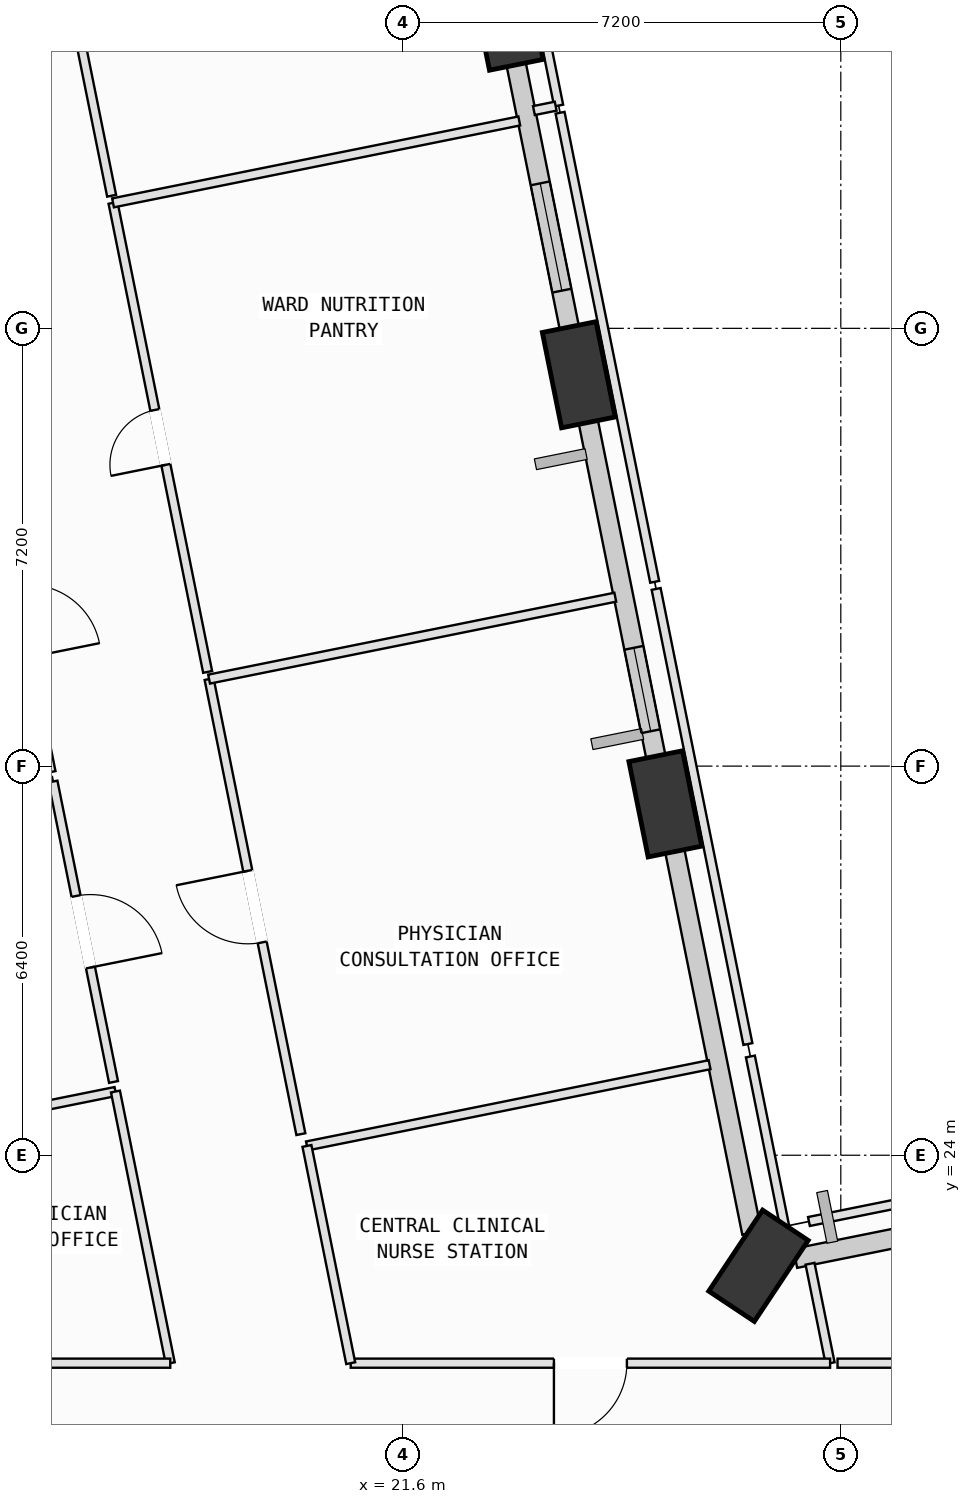
"""IFC4 building model, lengths in metres.
Left out: names, types, materials, properties, quantities, classifications, styles, units other than length and angle.
Written with IfcOpenShell. Run it as: python <this file> out.ifc"""

import sys

from ifc_helpers import new_model, si_unit, direction, frame, frame_2d, origin, origin_2d, place, context, subcontext, project, spatial, rectangle, extrude, element, fill, save


model = new_model("IFC4")
c1 = context("Model", 3, precision=1e-05, world=origin(), true_north=direction((0.0, 1.0)))
c2 = subcontext(c1, "Body", "Model", "MODEL_VIEW")
j1 = project(units=[si_unit("LENGTHUNIT", "METRE"), si_unit("PLANEANGLEUNIT", "RADIAN")], contexts=[c1])
p1 = place(None, origin())
s1 = spatial("IfcSite", under=j1, at=p1, CompositionType="ELEMENT")
p2 = place(p1, origin())
s2 = spatial("IfcBuilding", under=s1, at=p2, CompositionType="ELEMENT")
p3 = place(p2, frame((0.0, 0.0, 71.0)))
s3 = spatial("IfcBuildingStorey", under=s2, at=p3, CompositionType="ELEMENT", Elevation=71.0)
p4 = place(p3, frame((27.446, 22.182, 0.002), z_axis=(0.011052567647, -0.025402586416, 0.999616201025), x_axis=(0.175259325903, 0.98425187011, 0.023074333536)))
e1 = element("IfcColumn", 1, at=p4, inside=s3, PredefinedType="COLUMN", context=c2, shape_type="SweptSolid", body=[
    extrude(rectangle(XDim=1.6, YDim=0.9, at=origin_2d()), origin(), (0.0, 0.0, 1.0), 3.998),
])
p5 = place(p3, frame((25.914, 29.779, 0.002), z_axis=(-0.020327474655, -0.031986776934, 0.999281561861), x_axis=(0.358573515235, 0.932761915161, 0.037151632506)))
e2 = element("IfcColumn", 2, at=p5, inside=s3, PredefinedType="COLUMN", context=c2, shape_type="SweptSolid", body=[
    extrude(rectangle(XDim=1.6, YDim=0.9, at=origin_2d()), origin(), (0.0, 0.0, 1.0), 4.0),
])
p6 = place(p3, frame((24.491, 36.837, 0.002), z_axis=(-0.04944522251, -0.038105134487, 0.998049682479), x_axis=(0.654284243965, 0.753768890214, 0.061193040821)))
e3 = element("IfcColumn", 3, at=p6, inside=s3, PredefinedType="COLUMN", context=c2, shape_type="SweptSolid", body=[
    extrude(rectangle(XDim=1.6, YDim=0.9, at=origin_2d()), origin(), (0.0, 0.0, 1.0), 4.004),
])
p7 = place(p3, frame((23.305, 42.719, 0.002), z_axis=(-0.07364612951, -0.043092115449, 0.996353008323), x_axis=(0.743170140005, 0.663853828041, 0.083643517389)))
e4 = element("IfcColumn", 4, at=p7, inside=s3, PredefinedType="COLUMN", context=c2, shape_type="SweptSolid", body=[
    extrude(rectangle(XDim=1.6, YDim=0.9, at=origin_2d()), origin(), (0.0, 0.0, 1.0), 4.011),
])
p8 = place(p3, frame((28.051, 22.304, 0.0), z_axis=(0.0, 0.0, 1.0), x_axis=(0.980271717469, 0.197654648138, 0.0)))
e5 = element("IfcWall", 5, at=p8, inside=s3, PredefinedType="SOLIDWALL", context=c2, shape_type="SweptSolid", body=[
    extrude(rectangle(XDim=5.736, YDim=0.32, at=frame_2d((2.868, 0.0))), origin(), (0.0, 0.0, 1.0), 3.165),
])
p9 = place(p8, frame((2.344, 0.0, 0.75)))
e6 = element("IfcOpeningElement", 6, at=p9, cuts=e5, PredefinedType="OPENING", context=c2, shape_type="SweptSolid", body=[
    extrude(rectangle(XDim=1.6, YDim=1.95, at=frame_2d((0.8, 0.975))), frame((0.0, 0.17, 0.0), z_axis=(0.0, -1.0, 0.0), x_axis=(1.0, 0.0, 0.0)), (0.0, 0.0, 1.0), 0.34),
])
p10 = place(p3, frame((27.337, 22.725, 0.0), z_axis=(0.0, 0.0, 1.0), x_axis=(-0.1976674394, 0.980269138248, 0.0)))
e7 = element("IfcWall", 7, at=p10, inside=s3, PredefinedType="SOLIDWALL", context=c2, shape_type="SweptSolid", body=[
    extrude(rectangle(XDim=6.536, YDim=0.32, at=frame_2d((3.268, 0.0))), origin(), (0.0, 0.0, 1.0), 2.865),
])
p11 = place(p3, frame((25.805, 30.319, 0.0), z_axis=(0.0, 0.0, 1.0), x_axis=(-0.197666151395, 0.980269397968, 0.0)))
e8 = element("IfcWall", 8, at=p11, inside=s3, PredefinedType="SOLIDWALL", context=c2, shape_type="SweptSolid", body=[
    extrude(rectangle(XDim=5.997, YDim=0.32, at=frame_2d((2.998, 0.0))), origin(), (0.0, 0.0, 1.0), 3.165),
])
p12 = place(p11, frame((0.667, 0.0, 0.75)))
e9 = element("IfcOpeningElement", 9, at=p12, cuts=e8, PredefinedType="OPENING", context=c2, shape_type="SweptSolid", body=[
    extrude(rectangle(XDim=1.4, YDim=1.85, at=frame_2d((0.7, 0.925))), frame((0.0, 0.17, 0.0), z_axis=(0.0, -1.0, 0.0), x_axis=(1.0, 0.0, 0.0)), (0.0, 0.0, 1.0), 0.34),
])
p13 = place(p3, frame((24.384, 37.368, 0.0), z_axis=(0.0, 0.0, 1.0), x_axis=(-0.197636570542, 0.980275362327, 0.0)))
e10 = element("IfcWall", 10, at=p13, inside=s3, PredefinedType="SOLIDWALL", context=c2, shape_type="SweptSolid", body=[
    extrude(rectangle(XDim=4.816, YDim=0.32, at=frame_2d((2.408, 0.0))), origin(), (0.0, 0.0, 1.0), 3.165),
])
p14 = place(p13, frame((0.869, 0.0, 0.75)))
e11 = element("IfcOpeningElement", 11, at=p14, cuts=e10, PredefinedType="OPENING", context=c2, shape_type="SweptSolid", body=[
    extrude(rectangle(XDim=1.8, YDim=2.05, at=frame_2d((0.9, 1.025))), frame((0.0, 0.17, 0.0), z_axis=(0.0, -1.0, 0.0), x_axis=(1.0, 0.0, 0.0)), (0.0, 0.0, 1.0), 0.34),
])
p15 = place(p3, frame((6.122, 22.881, 0.0), z_axis=(0.0, 0.0, 1.0), x_axis=(0.980278085225, 0.197623064515, 0.0)))
e12 = element("IfcWall", 12, at=p15, inside=s3, PredefinedType="PARTITIONING", context=c2, shape_type="SweptSolid", body=[
    extrude(rectangle(XDim=10.965, YDim=0.15, at=frame_2d((5.483, 0.0))), origin(), (0.0, 0.0, 1.0), 3.78),
])
p16 = place(p3, frame((16.871, 25.048, 0.0), z_axis=(0.0, 0.0, 1.0), x_axis=(0.197650705998, -0.980272512324, 0.0)))
e13 = element("IfcWall", 13, at=p16, inside=s3, PredefinedType="PARTITIONING", context=c2, shape_type="SweptSolid", body=[
    extrude(rectangle(XDim=4.558, YDim=0.15, at=frame_2d((2.279, 0.0))), origin(), (0.0, 0.0, 1.0), 3.78),
])
p17 = place(p3, frame((17.772, 20.58, 0.0), z_axis=(0.0, 0.0, 1.0), x_axis=(-1.0, 0.0, 0.0)))
e14 = element("IfcWall", 14, at=p17, inside=s3, PredefinedType="PARTITIONING", context=c2, shape_type="SweptSolid", body=[
    extrude(rectangle(XDim=8.425, YDim=0.15, at=frame_2d((4.212, 0.0))), origin(), (0.0, 0.0, 1.0), 3.78),
])
p18 = place(p17, frame((3.613, 0.0, 0.0)))
e15 = element("IfcOpeningElement", 15, at=p18, cuts=e14, PredefinedType="OPENING", context=c2, shape_type="SweptSolid", body=[
    extrude(rectangle(XDim=1.2, YDim=2.15, at=frame_2d((0.6, 1.075))), frame((0.0, 0.085, 0.0), z_axis=(0.0, -1.0, 0.0), x_axis=(1.0, 0.0, 0.0)), (0.0, 0.0, 1.0), 0.17),
])
p19 = place(p3, frame((4.737, 27.906, 0.0), z_axis=(0.0, 0.0, 1.0), x_axis=(0.980260288007, 0.197711324301, 0.0)))
e16 = element("IfcWall", 16, at=p19, inside=s3, PredefinedType="PARTITIONING", context=c2, shape_type="SweptSolid", body=[
    extrude(rectangle(XDim=11.33, YDim=0.15, at=frame_2d((5.665, 0.0))), origin(), (0.0, 0.0, 1.0), 3.78),
])
p20 = place(p3, frame((15.843, 30.146, 0.0), z_axis=(0.0, 0.0, 1.0), x_axis=(0.197624916703, -0.980277711824, 0.0)))
e17 = element("IfcWall", 17, at=p20, inside=s3, PredefinedType="PARTITIONING", context=c2, shape_type="SweptSolid", body=[
    extrude(rectangle(XDim=5.04, YDim=0.15, at=frame_2d((2.52, 0.0))), origin(), (0.0, 0.0, 1.0), 3.78),
])
p21 = place(p20, frame((1.92, 0.0, 0.0)))
e18 = element("IfcOpeningElement", 18, at=p21, cuts=e17, PredefinedType="OPENING", context=c2, shape_type="SweptSolid", body=[
    extrude(rectangle(XDim=1.2, YDim=2.15, at=frame_2d((0.6, 1.075))), frame((0.0, 0.085, 0.0), z_axis=(0.0, -1.0, 0.0), x_axis=(1.0, 0.0, 0.0)), (0.0, 0.0, 1.0), 0.17),
])
p22 = place(p3, frame((14.815, 35.243, 0.0), z_axis=(0.0, 0.0, 1.0), x_axis=(0.197662458337, -0.980270142646, 0.0)))
e19 = element("IfcWall", 19, at=p22, inside=s3, PredefinedType="PARTITIONING", context=c2, shape_type="SweptSolid", body=[
    extrude(rectangle(XDim=5.039, YDim=0.15, at=frame_2d((2.52, 0.0))), origin(), (0.0, 0.0, 1.0), 3.78),
])
p23 = place(p22, frame((1.92, 0.0, 0.0)))
e20 = element("IfcOpeningElement", 20, at=p23, cuts=e19, PredefinedType="OPENING", context=c2, shape_type="SweptSolid", body=[
    extrude(rectangle(XDim=1.2, YDim=2.15, at=frame_2d((0.6, 1.075))), frame((0.0, 0.085, 0.0), z_axis=(0.0, -1.0, 0.0), x_axis=(1.0, 0.0, 0.0)), (0.0, 0.0, 1.0), 0.17),
])
p24 = place(p3, frame((20.02, 24.153, 0.0), z_axis=(0.0, 0.0, 1.0), x_axis=(0.980251267329, 0.197756043903, 0.0)))
e21 = element("IfcWall", 21, at=p24, inside=s3, PredefinedType="PARTITIONING", context=c2, shape_type="SweptSolid", body=[
    extrude(rectangle(XDim=6.755, YDim=0.15, at=frame_2d((3.378, 0.0))), origin(), (0.0, 0.0, 1.0), 3.78),
])
p25 = place(p3, frame((27.313, 25.624, 0.0), z_axis=(0.0, 0.0, 1.0), x_axis=(0.19753261981, -0.980296314443, 0.0)))
e22 = element("IfcWall", 22, at=p25, inside=s3, PredefinedType="PARTITIONING", context=c2, shape_type="SweptSolid", body=[
    extrude(rectangle(XDim=2.85, YDim=0.15, at=frame_2d((1.425, 0.0))), origin(), (0.0, 0.0, 1.0), 3.78),
])
p26 = place(p3, frame((28.294, 22.215, 0.0), z_axis=(0.0, 0.0, 1.0), x_axis=(0.197889115296, -0.980224412085, 0.0)))
e23 = element("IfcWall", 23, at=p26, inside=s3, PredefinedType="PARTITIONING", context=c2, shape_type="SweptSolid", body=[
    extrude(rectangle(XDim=1.668, YDim=0.15, at=frame_2d((0.834, 0.0))), origin(), (0.0, 0.0, 1.0), 3.78),
])
p27 = place(p3, frame((28.624, 20.58, 0.0), z_axis=(0.0, 0.0, 1.0), x_axis=(-1.0, 0.0, 0.0)))
e24 = element("IfcWall", 24, at=p27, inside=s3, PredefinedType="PARTITIONING", context=c2, shape_type="SweptSolid", body=[
    extrude(rectangle(XDim=7.884, YDim=0.15, at=frame_2d((3.942, 0.0))), origin(), (0.0, 0.0, 1.0), 3.78),
])
p28 = place(p27, frame((3.342, 0.0, 0.0)))
e25 = element("IfcOpeningElement", 25, at=p28, cuts=e24, PredefinedType="OPENING", context=c2, shape_type="SweptSolid", body=[
    extrude(rectangle(XDim=1.2, YDim=2.15, at=frame_2d((0.6, 1.075))), frame((0.0, 0.085, 0.0), z_axis=(0.0, -1.0, 0.0), x_axis=(1.0, 0.0, 0.0)), (0.0, 0.0, 1.0), 0.17),
])
p29 = place(p3, frame((20.74, 20.58, 0.0), z_axis=(0.0, 0.0, 1.0), x_axis=(-0.197532878548, 0.980296262307, 0.0)))
e26 = element("IfcWall", 26, at=p29, inside=s3, PredefinedType="PARTITIONING", context=c2, shape_type="SweptSolid", body=[
    extrude(rectangle(XDim=3.645, YDim=0.15, at=frame_2d((1.822, 0.0))), origin(), (0.0, 0.0, 1.0), 3.78),
])
p30 = place(p3, frame((28.276, 22.91, 0.0), z_axis=(0.0, 0.0, 1.0), x_axis=(0.980264273595, 0.197691562574, 0.0)))
e27 = element("IfcWall", 27, at=p30, inside=s3, PredefinedType="PARTITIONING", context=c2, shape_type="SweptSolid", body=[
    extrude(rectangle(XDim=8.164, YDim=0.15, at=frame_2d((4.082, 0.0))), origin(), (0.0, 0.0, 1.0), 3.78),
])
p31 = place(p3, frame((33.616, 20.58, 0.0), z_axis=(0.0, 0.0, 1.0), x_axis=(-1.0, 0.0, 0.0)))
e28 = element("IfcWall", 28, at=p31, inside=s3, PredefinedType="PARTITIONING", context=c2, shape_type="SweptSolid", body=[
    extrude(rectangle(XDim=4.87, YDim=0.15, at=frame_2d((2.435, 0.0))), origin(), (0.0, 0.0, 1.0), 3.78),
])
p32 = place(p31, frame((1.835, 0.0, 0.0)))
e29 = element("IfcOpeningElement", 29, at=p32, cuts=e28, PredefinedType="OPENING", context=c2, shape_type="SweptSolid", body=[
    extrude(rectangle(XDim=1.2, YDim=2.15, at=frame_2d((0.6, 1.075))), frame((0.0, 0.085, 0.0), z_axis=(0.0, -1.0, 0.0), x_axis=(1.0, 0.0, 0.0)), (0.0, 0.0, 1.0), 0.17),
])
p33 = place(p3, frame((19.92, 24.347, 0.0), z_axis=(0.0, 0.0, 1.0), x_axis=(-0.197653276626, 0.980271994009, 0.0)))
e30 = element("IfcWall", 30, at=p33, inside=s3, PredefinedType="PARTITIONING", context=c2, shape_type="SweptSolid", body=[
    extrude(rectangle(XDim=7.635, YDim=0.15, at=frame_2d((3.817, 0.0))), origin(), (0.0, 0.0, 1.0), 3.78),
])
p34 = place(p33, frame((3.217, 0.0, 0.0)))
e31 = element("IfcOpeningElement", 31, at=p34, cuts=e30, PredefinedType="OPENING", context=c2, shape_type="SweptSolid", body=[
    extrude(rectangle(XDim=1.2, YDim=2.15, at=frame_2d((0.6, 1.075))), frame((0.0, 0.085, 0.0), z_axis=(0.0, -1.0, 0.0), x_axis=(1.0, 0.0, 0.0)), (0.0, 0.0, 1.0), 0.17),
])
p35 = place(p3, frame((18.411, 31.831, 0.0), z_axis=(0.0, 0.0, 1.0), x_axis=(0.980272194859, 0.1976522805, 0.0)))
e32 = element("IfcWall", 32, at=p35, inside=s3, PredefinedType="PARTITIONING", context=c2, shape_type="SweptSolid", body=[
    extrude(rectangle(XDim=6.815, YDim=0.15, at=frame_2d((3.407, 0.0))), origin(), (0.0, 0.0, 1.0), 3.78),
])
p36 = place(p3, frame((25.763, 33.314, 0.0), z_axis=(0.0, 0.0, 1.0), x_axis=(0.197634691003, -0.980275741265, 0.0)))
e33 = element("IfcWall", 33, at=p36, inside=s3, PredefinedType="PARTITIONING", context=c2, shape_type="SweptSolid", body=[
    extrude(rectangle(XDim=7.635, YDim=0.15, at=frame_2d((3.818, 0.0))), origin(), (0.0, 0.0, 1.0), 3.78),
])
p37 = place(p3, frame((18.387, 31.949, 0.0), z_axis=(0.0, 0.0, 1.0), x_axis=(-0.197690746024, 0.98026443827, 0.0)))
e34 = element("IfcWall", 34, at=p37, inside=s3, PredefinedType="PARTITIONING", context=c2, shape_type="SweptSolid", body=[
    extrude(rectangle(XDim=7.87, YDim=0.15, at=frame_2d((3.935, 0.0))), origin(), (0.0, 0.0, 1.0), 3.78),
])
p38 = place(p37, frame((3.475, 0.0, 0.0)))
e35 = element("IfcOpeningElement", 35, at=p38, cuts=e34, PredefinedType="OPENING", context=c2, shape_type="SweptSolid", body=[
    extrude(rectangle(XDim=0.92, YDim=2.1, at=frame_2d((0.46, 1.05))), frame((0.0, 0.085, 0.0), z_axis=(0.0, -1.0, 0.0), x_axis=(1.0, 0.0, 0.0)), (0.0, 0.0, 1.0), 0.17),
])
p39 = place(p3, frame((16.831, 39.664, 0.0), z_axis=(0.0, 0.0, 1.0), x_axis=(0.980276392981, 0.197631458435, 0.0)))
e36 = element("IfcWall", 36, at=p39, inside=s3, PredefinedType="PARTITIONING", context=c2, shape_type="SweptSolid", body=[
    extrude(rectangle(XDim=6.815, YDim=0.15, at=frame_2d((3.408, 0.0))), origin(), (0.0, 0.0, 1.0), 3.78),
])
p40 = place(p3, frame((24.183, 41.146, 0.0), z_axis=(0.0, 0.0, 1.0), x_axis=(0.197690746024, -0.98026443827, 0.0)))
e37 = element("IfcWall", 37, at=p40, inside=s3, PredefinedType="PARTITIONING", context=c2, shape_type="SweptSolid", body=[
    extrude(rectangle(XDim=7.87, YDim=0.15, at=frame_2d((3.935, 0.0))), origin(), (0.0, 0.0, 1.0), 3.78),
])
p41 = place(p3, frame((22.876, 47.631, 0.0), z_axis=(0.0, 0.0, 1.0), x_axis=(0.197669966199, -0.980268628725, 0.0)))
e38 = element("IfcWall", 38, at=p41, inside=s3, PredefinedType="PARTITIONING", context=c2, shape_type="SweptSolid", body=[
    extrude(rectangle(XDim=6.495, YDim=0.15, at=frame_2d((3.248, 0.0))), origin(), (0.0, 0.0, 1.0), 3.78),
])
p42 = place(p3, frame((24.111, 41.254, 0.0), z_axis=(0.0, 0.0, 1.0), x_axis=(-0.980374510456, -0.197144158544, 0.0)))
e39 = element("IfcWall", 39, at=p42, inside=s3, PredefinedType="PARTITIONING", context=c2, shape_type="SweptSolid", body=[
    extrude(rectangle(XDim=0.365, YDim=0.15, at=frame_2d((0.183, 0.0))), origin(), (0.0, 0.0, 1.0), 3.78),
])
p43 = place(p3, frame((16.808, 39.781, 0.0), z_axis=(0.0, 0.0, 1.0), x_axis=(-0.197804914587, 0.980241406882, 0.0)))
e40 = element("IfcWall", 40, at=p43, inside=s3, PredefinedType="PARTITIONING", context=c2, shape_type="SweptSolid", body=[
    extrude(rectangle(XDim=7.311, YDim=0.15, at=frame_2d((3.655, 0.0))), origin(), (0.0, 0.0, 1.0), 3.78),
])
p44 = place(p43, frame((3.195, 0.0, 0.0)))
e41 = element("IfcOpeningElement", 41, at=p44, cuts=e40, PredefinedType="OPENING", context=c2, shape_type="SweptSolid", body=[
    extrude(rectangle(XDim=0.92, YDim=2.1, at=frame_2d((0.46, 1.05))), frame((0.0, 0.085, 0.0), z_axis=(0.0, -1.0, 0.0), x_axis=(1.0, 0.0, 0.0)), (0.0, 0.0, 1.0), 0.17),
])
p45 = place(p12, origin())
e42 = element("IfcWindow", 42, at=p45, inside=s3, PartitioningType="SINGLE_PANEL", PredefinedType="WINDOW", context=c2, shape_type="SweptSolid", body=[
    extrude(rectangle(XDim=1.4, YDim=1.85, at=frame_2d((0.7, 0.925))), frame((0.0, 0.03, 0.0), z_axis=(0.0, -1.0, 0.0), x_axis=(1.0, 0.0, 0.0)), (0.0, 0.0, 1.0), 0.06),
])
fill(e9, e42)
p46 = place(p14, origin())
e43 = element("IfcWindow", 43, at=p46, inside=s3, PartitioningType="SINGLE_PANEL", PredefinedType="WINDOW", context=c2, shape_type="SweptSolid", body=[
    extrude(rectangle(XDim=1.8, YDim=2.05, at=frame_2d((0.9, 1.025))), frame((0.0, 0.03, 0.0), z_axis=(0.0, -1.0, 0.0), x_axis=(1.0, 0.0, 0.0)), (0.0, 0.0, 1.0), 0.06),
])
fill(e11, e43)
p47 = place(p21, origin())
e44 = element("IfcDoor", 44, at=p47, inside=s3, OperationType="SINGLE_SWING_RIGHT", PredefinedType="DOOR", context=c2, shape_type="SweptSolid", body=[
    extrude(rectangle(XDim=1.2, YDim=2.15, at=frame_2d((0.6, 1.075))), frame((0.0, 0.025, 0.0), z_axis=(0.0, -1.0, 0.0), x_axis=(1.0, 0.0, 0.0)), (0.0, 0.0, 1.0), 0.05),
])
fill(e18, e44)
p48 = place(p28, origin())
e45 = element("IfcDoor", 45, at=p48, inside=s3, OperationType="SINGLE_SWING_RIGHT", PredefinedType="DOOR", context=c2, shape_type="SweptSolid", body=[
    extrude(rectangle(XDim=1.2, YDim=2.15, at=frame_2d((0.6, 1.075))), frame((0.0, 0.025, 0.0), z_axis=(0.0, -1.0, 0.0), x_axis=(1.0, 0.0, 0.0)), (0.0, 0.0, 1.0), 0.05),
])
fill(e25, e45)
p49 = place(p34, origin())
e46 = element("IfcDoor", 46, at=p49, inside=s3, OperationType="SINGLE_SWING_RIGHT", PredefinedType="DOOR", context=c2, shape_type="SweptSolid", body=[
    extrude(rectangle(XDim=1.2, YDim=2.15, at=frame_2d((0.6, 1.075))), frame((0.0, 0.025, 0.0), z_axis=(0.0, -1.0, 0.0), x_axis=(1.0, 0.0, 0.0)), (0.0, 0.0, 1.0), 0.05),
])
fill(e31, e46)
p50 = place(p38, origin())
e47 = element("IfcDoor", 47, at=p50, inside=s3, OperationType="SINGLE_SWING_LEFT", PredefinedType="DOOR", context=c2, shape_type="SweptSolid", body=[
    extrude(rectangle(XDim=0.92, YDim=2.1, at=frame_2d((0.46, 1.05))), frame((0.0, 0.025, 0.0), z_axis=(0.0, -1.0, 0.0), x_axis=(1.0, 0.0, 0.0)), (0.0, 0.0, 1.0), 0.05),
])
fill(e35, e47)
save(model, sys.argv[1])
